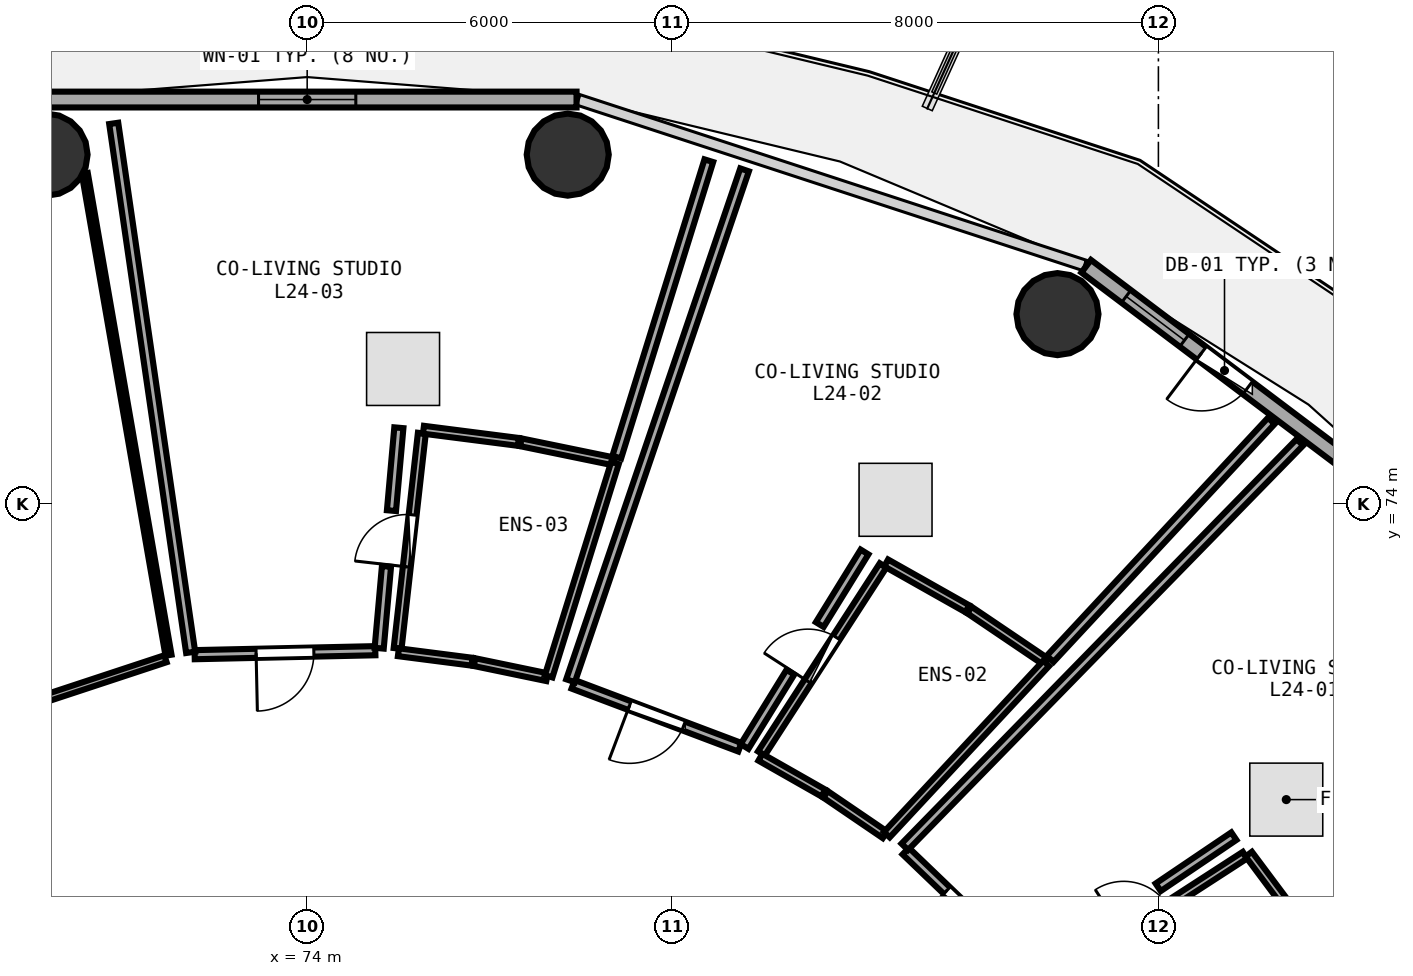
"""IFC4 building model, lengths in metres.
Left out: names, types, materials, properties, quantities, classifications, styles, units other than length and angle.
Written with IfcOpenShell. Run it as: python <this file> out.ifc"""

import sys

from ifc_helpers import new_model, si_unit, direction, frame, frame_2d, origin, origin_2d, place, context, subcontext, project, spatial, rectangle, circle, extrude, element, fill, save


model = new_model("IFC4")
c1 = context("Model", 3, precision=1e-05, world=origin(), true_north=direction((0.0, 1.0)))
c2 = subcontext(c1, "Body", "Model", "MODEL_VIEW")
j1 = project(units=[si_unit("LENGTHUNIT", "METRE"), si_unit("PLANEANGLEUNIT", "RADIAN")], contexts=[c1])
p1 = place(None, origin())
s1 = spatial("IfcSite", under=j1, at=p1, CompositionType="ELEMENT")
p2 = place(p1, origin())
s2 = spatial("IfcBuilding", under=s1, at=p2, CompositionType="ELEMENT")
p3 = place(p2, frame((0.0, 0.0, 95.1)))
s3 = spatial("IfcBuildingStorey", under=s2, at=p3, CompositionType="ELEMENT", Elevation=95.1)
for number, where, z_axis, x_axis in (
    (1, (86.34, 77.122, 0.0), (0.0, 0.0, 1.0), (1.0, 0.0, 0.0)),
    (2, (78.286, 79.745, 0.0), (0.0, 0.0, 1.0), (1.0, 0.0, 0.0)),
    (3, (69.714, 79.745, 0.0), (0.0, 0.0, 1.0), (1.0, 0.0, 0.0)),
):
    element("IfcColumn", number, at=place(p3, frame(where, z_axis=z_axis, x_axis=x_axis)), inside=s3, PredefinedType="COLUMN", context=c2, shape_type="SweptSolid", body=[
        extrude(circle(Radius=0.675, at=origin_2d()), origin(), (0.0, 0.0, 1.0), 3.75),
    ])
p4 = place(p3, frame((93.599, 72.793, 0.0), z_axis=(0.0, 0.0, 1.0), x_axis=(-0.798501507879, 0.601992808857, 0.0)))
e4 = element("IfcWall", 4, at=p4, inside=s3, PredefinedType="SOLIDWALL", context=c2, shape_type="SweptSolid", body=[
    extrude(rectangle(XDim=8.499, YDim=0.26, at=frame_2d((4.25, 0.0))), origin(), (0.0, 0.0, 1.0), 3.475),
])
p5 = place(p4, frame((5.175, 0.0, 0.0)))
e5 = element("IfcOpeningElement", 5, at=p5, cuts=e4, PredefinedType="OPENING", context=c2, shape_type="SweptSolid", body=[
    extrude(rectangle(XDim=0.95, YDim=2.1, at=frame_2d((0.475, 1.05))), frame((0.0, 0.14, 0.0), z_axis=(0.0, -1.0, 0.0), x_axis=(1.0, 0.0, 0.0)), (0.0, 0.0, 1.0), 0.28),
])
p6 = place(p4, frame((6.475, 0.0, 0.85)))
e6 = element("IfcOpeningElement", 6, at=p6, cuts=e4, PredefinedType="OPENING", context=c2, shape_type="SweptSolid", body=[
    extrude(rectangle(XDim=1.2, YDim=1.45, at=frame_2d((0.6, 0.725))), frame((0.0, 0.14, 0.0), z_axis=(0.0, -1.0, 0.0), x_axis=(1.0, 0.0, 0.0)), (0.0, 0.0, 1.0), 0.28),
])
p7 = place(p3, frame((78.43, 80.651, 0.0), z_axis=(0.0, 0.0, 1.0), x_axis=(-1.0, 0.0, 0.0)))
e7 = element("IfcWall", 7, at=p7, inside=s3, PredefinedType="SOLIDWALL", context=c2, shape_type="SweptSolid", body=[
    extrude(rectangle(XDim=8.861, YDim=0.26, at=frame_2d((4.43, 0.0))), origin(), (0.0, 0.0, 1.0), 3.475),
])
p8 = place(p7, frame((3.63, 0.0, 0.85)))
e8 = element("IfcOpeningElement", 8, at=p8, cuts=e7, PredefinedType="OPENING", context=c2, shape_type="SweptSolid", body=[
    extrude(rectangle(XDim=1.6, YDim=1.45, at=frame_2d((0.8, 0.725))), frame((0.0, 0.14, 0.0), z_axis=(0.0, -1.0, 0.0), x_axis=(1.0, 0.0, 0.0)), (0.0, 0.0, 1.0), 0.28),
])
p9 = place(p3, frame((86.156, 66.111, 0.0), z_axis=(0.0, 0.0, 1.0), x_axis=(0.839597088747, 0.543209654339, 0.0)))
e9 = element("IfcWall", 9, at=p9, inside=s3, PredefinedType="PLUMBINGWALL", context=c2, shape_type="SweptSolid", body=[
    extrude(rectangle(XDim=3.891, YDim=0.13, at=frame_2d((1.946, 0.0))), origin(), (0.0, 0.0, 1.0), 3.175),
])
p10 = place(p9, frame((1.516, 0.0, 0.0)))
e10 = element("IfcOpeningElement", 10, at=p10, cuts=e9, PredefinedType="OPENING", context=c2, shape_type="SweptSolid", body=[
    extrude(rectangle(XDim=0.86, YDim=2.05, at=frame_2d((0.43, 1.025))), frame((0.0, 0.075, 0.0), z_axis=(0.0, -1.0, 0.0), x_axis=(1.0, 0.0, 0.0)), (0.0, 0.0, 1.0), 0.15),
])
p11 = place(p3, frame((85.882, 66.337, 0.0), z_axis=(0.0, 0.0, 1.0), x_axis=(-0.721698326825, 0.692207718144, 0.0)))
e11 = element("IfcWall", 11, at=p11, inside=s3, PredefinedType="PARTITIONING", context=c2, shape_type="SweptSolid", body=[
    extrude(rectangle(XDim=2.823, YDim=0.15, at=frame_2d((1.412, 0.0))), origin(), (0.0, 0.0, 1.0), 2.925),
])
p12 = place(p11, frame((0.936, 0.0, 0.0)))
e12 = element("IfcOpeningElement", 12, at=p12, cuts=e11, PredefinedType="OPENING", context=c2, shape_type="SweptSolid", body=[
    extrude(rectangle(XDim=0.95, YDim=2.08, at=frame_2d((0.475, 1.04))), frame((0.0, 0.085, 0.0), z_axis=(0.0, -1.0, 0.0), x_axis=(1.0, 0.0, 0.0)), (0.0, 0.0, 1.0), 0.17),
])
p13 = place(p3, frame((81.469, 69.896, 0.0), z_axis=(0.0, 0.0, 1.0), x_axis=(0.543429789712, 0.839454622748, 0.0)))
e13 = element("IfcWall", 13, at=p13, inside=s3, PredefinedType="PLUMBINGWALL", context=c2, shape_type="SweptSolid", body=[
    extrude(rectangle(XDim=3.686, YDim=0.13, at=frame_2d((1.843, 0.0))), origin(), (0.0, 0.0, 1.0), 3.175),
])
p14 = place(p13, frame((1.413, 0.0, 0.0)))
e14 = element("IfcOpeningElement", 14, at=p14, cuts=e13, PredefinedType="OPENING", context=c2, shape_type="SweptSolid", body=[
    extrude(rectangle(XDim=0.86, YDim=2.05, at=frame_2d((0.43, 1.025))), frame((0.0, 0.075, 0.0), z_axis=(0.0, -1.0, 0.0), x_axis=(1.0, 0.0, 0.0)), (0.0, 0.0, 1.0), 0.15),
])
p15 = place(p3, frame((81.117, 69.999, 0.0), z_axis=(0.0, 0.0, 1.0), x_axis=(-0.935632349103, 0.352976071868, 0.0)))
e15 = element("IfcWall", 15, at=p15, inside=s3, PredefinedType="PARTITIONING", context=c2, shape_type="SweptSolid", body=[
    extrude(rectangle(XDim=2.931, YDim=0.15, at=frame_2d((1.465, 0.0))), origin(), (0.0, 0.0, 1.0), 2.925),
])
p16 = place(p15, frame((0.99, 0.0, 0.0)))
e16 = element("IfcOpeningElement", 16, at=p16, cuts=e15, PredefinedType="OPENING", context=c2, shape_type="SweptSolid", body=[
    extrude(rectangle(XDim=0.95, YDim=2.08, at=frame_2d((0.475, 1.04))), frame((0.0, 0.085, 0.0), z_axis=(0.0, -1.0, 0.0), x_axis=(1.0, 0.0, 0.0)), (0.0, 0.0, 1.0), 0.17),
])
p17 = place(p3, frame((75.488, 71.624, 0.0), z_axis=(0.0, 0.0, 1.0), x_axis=(0.111853147635, 0.993724747284, 0.0)))
e17 = element("IfcWall", 17, at=p17, inside=s3, PredefinedType="PLUMBINGWALL", context=c2, shape_type="SweptSolid", body=[
    extrude(rectangle(XDim=3.562, YDim=0.13, at=frame_2d((1.781, 0.0))), origin(), (0.0, 0.0, 1.0), 3.175),
])
p18 = place(p17, frame((1.351, 0.0, 0.0)))
e18 = element("IfcOpeningElement", 18, at=p18, cuts=e17, PredefinedType="OPENING", context=c2, shape_type="SweptSolid", body=[
    extrude(rectangle(XDim=0.86, YDim=2.05, at=frame_2d((0.43, 1.025))), frame((0.0, 0.075, 0.0), z_axis=(0.0, -1.0, 0.0), x_axis=(1.0, 0.0, 0.0)), (0.0, 0.0, 1.0), 0.15),
])
p19 = place(p3, frame((75.121, 71.587, 0.0), z_axis=(0.0, 0.0, 1.0), x_axis=(-0.999757617916, -0.022016026426, 0.0)))
e19 = element("IfcWall", 19, at=p19, inside=s3, PredefinedType="PARTITIONING", context=c2, shape_type="SweptSolid", body=[
    extrude(rectangle(XDim=2.972, YDim=0.15, at=frame_2d((1.486, 0.0))), origin(), (0.0, 0.0, 1.0), 3.48),
])
p20 = place(p19, frame((1.011, 0.0, 0.0)))
e20 = element("IfcOpeningElement", 20, at=p20, cuts=e19, PredefinedType="OPENING", context=c2, shape_type="SweptSolid", body=[
    extrude(rectangle(XDim=0.95, YDim=2.08, at=frame_2d((0.475, 1.04))), frame((0.0, 0.085, 0.0), z_axis=(0.0, -1.0, 0.0), x_axis=(1.0, 0.0, 0.0)), (0.0, 0.0, 1.0), 0.17),
])
p21 = place(p3, frame((71.67, 71.454, 0.0), z_axis=(0.0, 0.0, 1.0), x_axis=(-0.949607265123, -0.313442246716, 0.0)))
e21 = element("IfcWall", 21, at=p21, inside=s3, PredefinedType="PARTITIONING", context=c2, shape_type="SweptSolid", body=[
    extrude(rectangle(XDim=5.708, YDim=0.12, at=frame_2d((2.854, 0.0))), origin(), (0.0, 0.0, 1.0), 2.925),
])
p22 = place(p21, frame((2.404, 0.0, 0.0)))
e22 = element("IfcOpeningElement", 22, at=p22, cuts=e21, PredefinedType="OPENING", context=c2, shape_type="SweptSolid", body=[
    extrude(rectangle(XDim=0.9, YDim=2.08, at=frame_2d((0.45, 1.04))), frame((0.0, 0.07, 0.0), z_axis=(0.0, -1.0, 0.0), x_axis=(1.0, 0.0, 0.0)), (0.0, 0.0, 1.0), 0.14),
])
p23 = place(p3, frame((89.486, 68.241, 0.0), z_axis=(0.0, 0.0, 1.0), x_axis=(0.598215175904, -0.801335512328, 0.0)))
e23 = element("IfcWall", 23, at=p23, inside=s3, PredefinedType="PLUMBINGWALL", context=c2, shape_type="SweptSolid", body=[
    extrude(rectangle(XDim=1.468, YDim=0.13, at=frame_2d((0.734, 0.0))), origin(), (0.0, 0.0, 1.0), 3.48),
])
p24 = place(p3, frame((83.829, 68.362, 0.0), z_axis=(0.0, 0.0, 1.0), x_axis=(0.698749209364, 0.715366718833, 0.0)))
e24 = element("IfcWall", 24, at=p24, inside=s3, PredefinedType="PARTITIONING", context=c2, shape_type="SweptSolid", body=[
    extrude(rectangle(XDim=9.3, YDim=0.15, at=frame_2d((4.65, 0.0))), origin(), (0.0, 0.0, 1.0), 2.975),
])
p25 = place(p3, frame((89.241, 68.537, 0.0), z_axis=(0.0, 0.0, 1.0), x_axis=(-0.828582854192, -0.559866460631, 0.0)))
e25 = element("IfcWall", 25, at=p25, inside=s3, PredefinedType="PARTITIONING", context=c2, shape_type="SweptSolid", body=[
    extrude(rectangle(XDim=1.502, YDim=0.15, at=frame_2d((0.751, 0.0))), origin(), (0.0, 0.0, 1.0), 3.175),
])
p26 = place(p3, frame((83.503, 68.558, 0.0), z_axis=(0.0, 0.0, 1.0), x_axis=(-0.826715543633, 0.56262012932, 0.0)))
e26 = element("IfcWall", 26, at=p26, inside=s3, PredefinedType="PLUMBINGWALL", context=c2, shape_type="SweptSolid", body=[
    extrude(rectangle(XDim=1.184, YDim=0.13, at=frame_2d((0.592, 0.0))), origin(), (0.0, 0.0, 1.0), 2.925),
])
p27 = place(p3, frame((82.49, 69.246, 0.0), z_axis=(0.0, 0.0, 1.0), x_axis=(-0.869224537935, 0.494417538778, 0.0)))
e27 = element("IfcWall", 27, at=p27, inside=s3, PredefinedType="PLUMBINGWALL", context=c2, shape_type="SweptSolid", body=[
    extrude(rectangle(XDim=1.192, YDim=0.13, at=frame_2d((0.596, 0.0))), origin(), (0.0, 0.0, 1.0), 3.48),
])
p28 = place(p3, frame((83.522, 73.03, 0.0), z_axis=(0.0, 0.0, 1.0), x_axis=(0.870915556508, -0.491432694713, 0.0)))
e28 = element("IfcWall", 28, at=p28, inside=s3, PredefinedType="PLUMBINGWALL", context=c2, shape_type="SweptSolid", body=[
    extrude(rectangle(XDim=1.533, YDim=0.13, at=frame_2d((0.767, 0.0))), origin(), (0.0, 0.0, 1.0), 2.925),
])
p29 = place(p3, frame((84.892, 72.256, 0.0), z_axis=(0.0, 0.0, 1.0), x_axis=(0.828476223524, -0.560024237917, 0.0)))
e29 = element("IfcWall", 29, at=p29, inside=s3, PredefinedType="PLUMBINGWALL", context=c2, shape_type="SweptSolid", body=[
    extrude(rectangle(XDim=1.521, YDim=0.13, at=frame_2d((0.76, 0.0))), origin(), (0.0, 0.0, 1.0), 3.175),
])
p30 = place(p3, frame((86.154, 71.378, 0.0), z_axis=(0.0, 0.0, 1.0), x_axis=(-0.681137169266, -0.732155828116, 0.0)))
e30 = element("IfcWall", 30, at=p30, inside=s3, PredefinedType="PLUMBINGWALL", context=c2, shape_type="SweptSolid", body=[
    extrude(rectangle(XDim=3.847, YDim=0.13, at=frame_2d((1.924, 0.0))), origin(), (0.0, 0.0, 1.0), 3.175),
])
p31 = place(p3, frame((78.332, 71.093, 0.0), z_axis=(0.0, 0.0, 1.0), x_axis=(0.322500856516, 0.946569172088, 0.0)))
e31 = element("IfcWall", 31, at=p31, inside=s3, PredefinedType="PARTITIONING", context=c2, shape_type="SweptSolid", body=[
    extrude(rectangle(XDim=8.875, YDim=0.15, at=frame_2d((4.438, 0.0))), origin(), (0.0, 0.0, 1.0), 2.925),
])
p32 = place(p3, frame((89.858, 75.367, 0.0), z_axis=(0.0, 0.0, 1.0), x_axis=(-0.680841843483, -0.732430463704, 0.0)))
e32 = element("IfcWall", 32, at=p32, inside=s3, PredefinedType="PARTITIONING", context=c2, shape_type="SweptSolid", body=[
    extrude(rectangle(XDim=5.343, YDim=0.15, at=frame_2d((2.671, 0.0))), origin(), (0.0, 0.0, 1.0), 2.975),
])
p33 = place(p3, frame((83.167, 73.21, 0.0), z_axis=(0.0, 0.0, 1.0), x_axis=(-0.525107327047, -0.8510360128, 0.0)))
e33 = element("IfcWall", 33, at=p33, inside=s3, PredefinedType="PARTITIONING", context=c2, shape_type="SweptSolid", body=[
    extrude(rectangle(XDim=1.402, YDim=0.15, at=frame_2d((0.701, 0.0))), origin(), (0.0, 0.0, 1.0), 3.175),
])
p34 = place(p3, frame((81.948, 71.233, 0.0), z_axis=(0.0, 0.0, 1.0), x_axis=(-0.52498935376, -0.851108793539, 0.0)))
e34 = element("IfcWall", 34, at=p34, inside=s3, PredefinedType="PARTITIONING", context=c2, shape_type="SweptSolid", body=[
    extrude(rectangle(XDim=1.435, YDim=0.15, at=frame_2d((0.718, 0.0))), origin(), (0.0, 0.0, 1.0), 3.235),
])
p35 = place(p3, frame((77.946, 71.151, 0.0), z_axis=(0.0, 0.0, 1.0), x_axis=(-0.979121805859, 0.203274418684, 0.0)))
e35 = element("IfcWall", 35, at=p35, inside=s3, PredefinedType="PLUMBINGWALL", context=c2, shape_type="SweptSolid", body=[
    extrude(rectangle(XDim=1.219, YDim=0.13, at=frame_2d((0.609, 0.0))), origin(), (0.0, 0.0, 1.0), 3.48),
])
p36 = place(p3, frame((76.713, 71.406, 0.0), z_axis=(0.0, 0.0, 1.0), x_axis=(-0.991848040681, 0.127426308891, 0.0)))
e36 = element("IfcWall", 36, at=p36, inside=s3, PredefinedType="PLUMBINGWALL", context=c2, shape_type="SweptSolid", body=[
    extrude(rectangle(XDim=1.222, YDim=0.13, at=frame_2d((0.611, 0.0))), origin(), (0.0, 0.0, 1.0), 3.48),
])
p37 = place(p3, frame((75.913, 75.22, 0.0), z_axis=(0.0, 0.0, 1.0), x_axis=(0.991898711333, -0.127031281405, 0.0)))
e37 = element("IfcWall", 37, at=p37, inside=s3, PredefinedType="PLUMBINGWALL", context=c2, shape_type="SweptSolid", body=[
    extrude(rectangle(XDim=1.574, YDim=0.13, at=frame_2d((0.787, 0.0))), origin(), (0.0, 0.0, 1.0), 3.48),
])
p38 = place(p3, frame((77.514, 75.014, 0.0), z_axis=(0.0, 0.0, 1.0), x_axis=(0.979487788462, -0.201503529137, 0.0)))
e38 = element("IfcWall", 38, at=p38, inside=s3, PredefinedType="PLUMBINGWALL", context=c2, shape_type="SweptSolid", body=[
    extrude(rectangle(XDim=1.568, YDim=0.13, at=frame_2d((0.784, 0.0))), origin(), (0.0, 0.0, 1.0), 3.48),
])
p39 = place(p3, frame((79.063, 74.675, 0.0), z_axis=(0.0, 0.0, 1.0), x_axis=(-0.296927892497, -0.954899903999, 0.0)))
e39 = element("IfcWall", 39, at=p39, inside=s3, PredefinedType="PLUMBINGWALL", context=c2, shape_type="SweptSolid", body=[
    extrude(rectangle(XDim=3.675, YDim=0.13, at=frame_2d((1.837, 0.0))), origin(), (0.0, 0.0, 1.0), 3.175),
])
p40 = place(p3, frame((72.084, 71.56, 0.0), z_axis=(0.0, 0.0, 1.0), x_axis=(-0.143952208647, 0.989584640961, 0.0)))
e40 = element("IfcWall", 40, at=p40, inside=s3, PredefinedType="PARTITIONING", context=c2, shape_type="SweptSolid", body=[
    extrude(rectangle(XDim=8.79, YDim=0.15, at=frame_2d((4.395, 0.0))), origin(), (0.0, 0.0, 1.0), 2.975),
])
p41 = place(p3, frame((80.606, 79.645, 0.0), z_axis=(0.0, 0.0, 1.0), x_axis=(-0.2966895532, -0.954973983427, 0.0)))
e41 = element("IfcWall", 41, at=p41, inside=s3, PredefinedType="PARTITIONING", context=c2, shape_type="SweptSolid", body=[
    extrude(rectangle(XDim=5.104, YDim=0.15, at=frame_2d((2.552, 0.0))), origin(), (0.0, 0.0, 1.0), 2.925),
])
p42 = place(p3, frame((75.508, 75.253, 0.0), z_axis=(0.0, 0.0, 1.0), x_axis=(-0.088846600374, -0.996045321058, 0.0)))
e42 = element("IfcWall", 42, at=p42, inside=s3, PredefinedType="PARTITIONING", context=c2, shape_type="SweptSolid", body=[
    extrude(rectangle(XDim=1.368, YDim=0.15, at=frame_2d((0.684, 0.0))), origin(), (0.0, 0.0, 1.0), 3.175),
])
p43 = place(p3, frame((75.305, 72.973, 0.0), z_axis=(0.0, 0.0, 1.0), x_axis=(-0.088906327267, -0.996039991653, 0.0)))
e43 = element("IfcWall", 43, at=p43, inside=s3, PredefinedType="PARTITIONING", context=c2, shape_type="SweptSolid", body=[
    extrude(rectangle(XDim=1.351, YDim=0.15, at=frame_2d((0.676, 0.0))), origin(), (0.0, 0.0, 1.0), 3.48),
])
p44 = place(p3, frame((70.343, 79.436, 0.0), z_axis=(0.0, 0.0, 1.0), x_axis=(0.171306583965, -0.985217769983, 0.0)))
e44 = element("IfcWall", 44, at=p44, inside=s3, PredefinedType="PARTITIONING", context=c2, shape_type="SweptSolid", body=[
    extrude(rectangle(XDim=8.042, YDim=0.1, at=frame_2d((4.021, 0.0))), origin(), (0.0, 0.0, 1.0), 3.175),
])
p45 = place(p3, frame((87.625, 63.84, 0.0), z_axis=(0.0, 0.0, 1.0), x_axis=(0.92321744991, 0.384277946521, 0.0)))
e45 = element("IfcWall", 45, at=p45, inside=s3, PredefinedType="PARTITIONING", context=c2, shape_type="SweptSolid", body=[
    extrude(rectangle(XDim=9.762, YDim=0.15, at=frame_2d((4.881, 0.0))), origin(), (0.0, 0.0, 1.0), 2.925),
])
p46 = place(p5, frame((0.95, 0.0, 0.0), z_axis=(0.0, 0.0, 1.0), x_axis=(-1.0, 0.0, 0.0)))
e46 = element("IfcDoor", 46, at=p46, inside=s3, OperationType="SINGLE_SWING_LEFT", PredefinedType="DOOR", context=c2, shape_type="SweptSolid", body=[
    extrude(rectangle(XDim=0.95, YDim=2.1, at=frame_2d((0.475, 1.05))), frame((0.0, 0.025, 0.0), z_axis=(0.0, -1.0, 0.0), x_axis=(1.0, 0.0, 0.0)), (0.0, 0.0, 1.0), 0.05),
])
fill(e5, e46)
p47 = place(p6, origin())
e47 = element("IfcWindow", 47, at=p47, inside=s3, PartitioningType="SINGLE_PANEL", PredefinedType="WINDOW", context=c2, shape_type="SweptSolid", body=[
    extrude(rectangle(XDim=1.2, YDim=1.45, at=frame_2d((0.6, 0.725))), frame((0.0, 0.03, 0.0), z_axis=(0.0, -1.0, 0.0), x_axis=(1.0, 0.0, 0.0)), (0.0, 0.0, 1.0), 0.06),
])
fill(e6, e47)
p48 = place(p8, origin())
e48 = element("IfcWindow", 48, at=p48, inside=s3, PartitioningType="SINGLE_PANEL", PredefinedType="WINDOW", context=c2, shape_type="SweptSolid", body=[
    extrude(rectangle(XDim=1.6, YDim=1.45, at=frame_2d((0.8, 0.725))), frame((0.0, 0.03, 0.0), z_axis=(0.0, -1.0, 0.0), x_axis=(1.0, 0.0, 0.0)), (0.0, 0.0, 1.0), 0.06),
])
fill(e8, e48)
p49 = place(p12, origin())
e49 = element("IfcDoor", 49, at=p49, inside=s3, OperationType="SINGLE_SWING_RIGHT", PredefinedType="DOOR", context=c2, shape_type="SweptSolid", body=[
    extrude(rectangle(XDim=0.95, YDim=2.08, at=frame_2d((0.475, 1.04))), frame((0.0, 0.025, 0.0), z_axis=(0.0, -1.0, 0.0), x_axis=(1.0, 0.0, 0.0)), (0.0, 0.0, 1.0), 0.05),
])
fill(e12, e49)
p50 = place(p14, origin())
e50 = element("IfcDoor", 50, at=p50, inside=s3, OperationType="SINGLE_SWING_LEFT", PredefinedType="DOOR", context=c2, shape_type="SweptSolid", body=[
    extrude(rectangle(XDim=0.86, YDim=2.05, at=frame_2d((0.43, 1.025))), frame((0.0, 0.025, 0.0), z_axis=(0.0, -1.0, 0.0), x_axis=(1.0, 0.0, 0.0)), (0.0, 0.0, 1.0), 0.05),
])
fill(e14, e50)
p51 = place(p16, origin())
e51 = element("IfcDoor", 51, at=p51, inside=s3, OperationType="SINGLE_SWING_RIGHT", PredefinedType="DOOR", context=c2, shape_type="SweptSolid", body=[
    extrude(rectangle(XDim=0.95, YDim=2.08, at=frame_2d((0.475, 1.04))), frame((0.0, 0.025, 0.0), z_axis=(0.0, -1.0, 0.0), x_axis=(1.0, 0.0, 0.0)), (0.0, 0.0, 1.0), 0.05),
])
fill(e16, e51)
p52 = place(p18, origin())
e52 = element("IfcDoor", 52, at=p52, inside=s3, OperationType="SINGLE_SWING_LEFT", PredefinedType="DOOR", context=c2, shape_type="SweptSolid", body=[
    extrude(rectangle(XDim=0.86, YDim=2.05, at=frame_2d((0.43, 1.025))), frame((0.0, 0.025, 0.0), z_axis=(0.0, -1.0, 0.0), x_axis=(1.0, 0.0, 0.0)), (0.0, 0.0, 1.0), 0.05),
])
fill(e18, e52)
p53 = place(p20, origin())
e53 = element("IfcDoor", 53, at=p53, inside=s3, OperationType="SINGLE_SWING_RIGHT", PredefinedType="DOOR", context=c2, shape_type="SweptSolid", body=[
    extrude(rectangle(XDim=0.95, YDim=2.08, at=frame_2d((0.475, 1.04))), frame((0.0, 0.025, 0.0), z_axis=(0.0, -1.0, 0.0), x_axis=(1.0, 0.0, 0.0)), (0.0, 0.0, 1.0), 0.05),
])
fill(e20, e53)
save(model, sys.argv[1])
